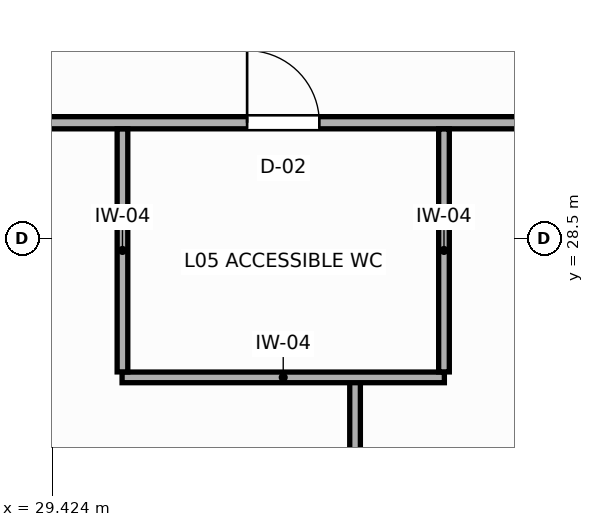
"""IFC4 building model, lengths in metres.
Left out: names, types, materials, properties, quantities, classifications, styles, units other than length and angle.
Written with IfcOpenShell. Run it as: python <this file> out.ifc"""

import sys

from ifc_helpers import new_model, si_unit, direction, frame, frame_2d, origin, place, context, subcontext, project, spatial, rectangle, extrude, element, fill, save


model = new_model("IFC4")
c1 = context("Model", 3, precision=1e-05, world=origin(), true_north=direction((0.0, 1.0)))
c2 = subcontext(c1, "Body", "Model", "MODEL_VIEW")
j1 = project(units=[si_unit("LENGTHUNIT", "METRE"), si_unit("PLANEANGLEUNIT", "RADIAN")], contexts=[c1])
p1 = place(None, origin())
s1 = spatial("IfcSite", under=j1, at=p1, CompositionType="ELEMENT")
p2 = place(p1, origin())
s2 = spatial("IfcBuilding", under=s1, at=p2, CompositionType="ELEMENT")
p3 = place(p2, frame((0.0, 0.0, 24.0)))
s3 = spatial("IfcBuildingStorey", under=s2, at=p3, CompositionType="ELEMENT", Elevation=24.0)
p4 = place(p3, frame((14.162, 30.025, 0.0), z_axis=(0.0, 0.0, 1.0), x_axis=(1.0, 0.0, 0.0)))
e1 = element("IfcWall", 1, at=p4, inside=s3, PredefinedType="PARTITIONING", context=c2, shape_type="SweptSolid", body=[
    extrude(rectangle(XDim=43.676, YDim=0.16, at=frame_2d((21.838, 0.0))), origin(), (0.0, 0.0, 1.0), 3.68),
])
p5 = place(p4, frame((17.823, 0.0, 0.0)))
e2 = element("IfcOpeningElement", 2, at=p5, cuts=e1, PredefinedType="OPENING", context=c2, shape_type="SweptSolid", body=[
    extrude(rectangle(XDim=0.95, YDim=2.05, at=frame_2d((0.475, 1.025))), frame((0.0, 0.09, 0.0), z_axis=(0.0, -1.0, 0.0), x_axis=(1.0, 0.0, 0.0)), (0.0, 0.0, 1.0), 0.18),
])
p6 = place(p4, frame((6.824, 0.0, 0.0)))
e3 = element("IfcOpeningElement", 3, at=p6, cuts=e1, PredefinedType="OPENING", context=c2, shape_type="SweptSolid", body=[
    extrude(rectangle(XDim=0.95, YDim=2.05, at=frame_2d((0.475, 1.025))), frame((0.0, 0.09, 0.0), z_axis=(0.0, -1.0, 0.0), x_axis=(1.0, 0.0, 0.0)), (0.0, 0.0, 1.0), 0.18),
])
p7 = place(p4, frame((27.146, 0.0, 0.0)))
e4 = element("IfcOpeningElement", 4, at=p7, cuts=e1, PredefinedType="OPENING", context=c2, shape_type="SweptSolid", body=[
    extrude(rectangle(XDim=0.95, YDim=2.05, at=frame_2d((0.475, 1.025))), frame((0.0, 0.09, 0.0), z_axis=(0.0, -1.0, 0.0), x_axis=(1.0, 0.0, 0.0)), (0.0, 0.0, 1.0), 0.18),
])
p8 = place(p3, frame((33.405, 3.129, 0.0), z_axis=(0.0, 0.0, 1.0), x_axis=(0.0, 1.0, 0.0)))
e5 = element("IfcWall", 5, at=p8, inside=s3, PredefinedType="PARTITIONING", context=c2, shape_type="SweptSolid", body=[
    extrude(rectangle(XDim=23.561, YDim=0.14, at=frame_2d((11.78, 0.0))), origin(), (0.0, 0.0, 1.0), 3.18),
])
p9 = place(p3, frame((30.34, 26.675, 0.0), z_axis=(0.0, 0.0, 1.0), x_axis=(1.0, 0.0, 0.0)))
e6 = element("IfcWall", 6, at=p9, inside=s3, PredefinedType="PARTITIONING", context=c2, shape_type="SweptSolid", body=[
    extrude(rectangle(XDim=4.24, YDim=0.14, at=frame_2d((2.12, 0.0))), origin(), (0.0, 0.0, 1.0), 3.68),
])
for number, where, z_axis, x_axis in (
    (7, (30.345, 26.747, 0.0), (0.0, 0.0, 1.0), (0.0, 1.0, 0.0)),
    (8, (34.575, 26.747, 0.0), (0.0, 0.0, 1.0), (0.0, 1.0, 0.0)),
):
    element("IfcWall", number, at=place(p3, frame(where, z_axis=z_axis, x_axis=x_axis)), inside=s3, PredefinedType="PARTITIONING", context=c2, shape_type="SweptSolid", body=[
        extrude(rectangle(XDim=3.196, YDim=0.14, at=frame_2d((1.598, 0.0))), origin(), (0.0, 0.0, 1.0), 3.68),
    ])
p10 = place(p5, origin())
e9 = element("IfcDoor", 9, at=p10, inside=s3, OperationType="SINGLE_SWING_LEFT", PredefinedType="DOOR", context=c2, shape_type="SweptSolid", body=[
    extrude(rectangle(XDim=0.95, YDim=2.05, at=frame_2d((0.475, 1.025))), frame((0.0, 0.025, 0.0), z_axis=(0.0, -1.0, 0.0), x_axis=(1.0, 0.0, 0.0)), (0.0, 0.0, 1.0), 0.05),
])
fill(e2, e9)
save(model, sys.argv[1])
